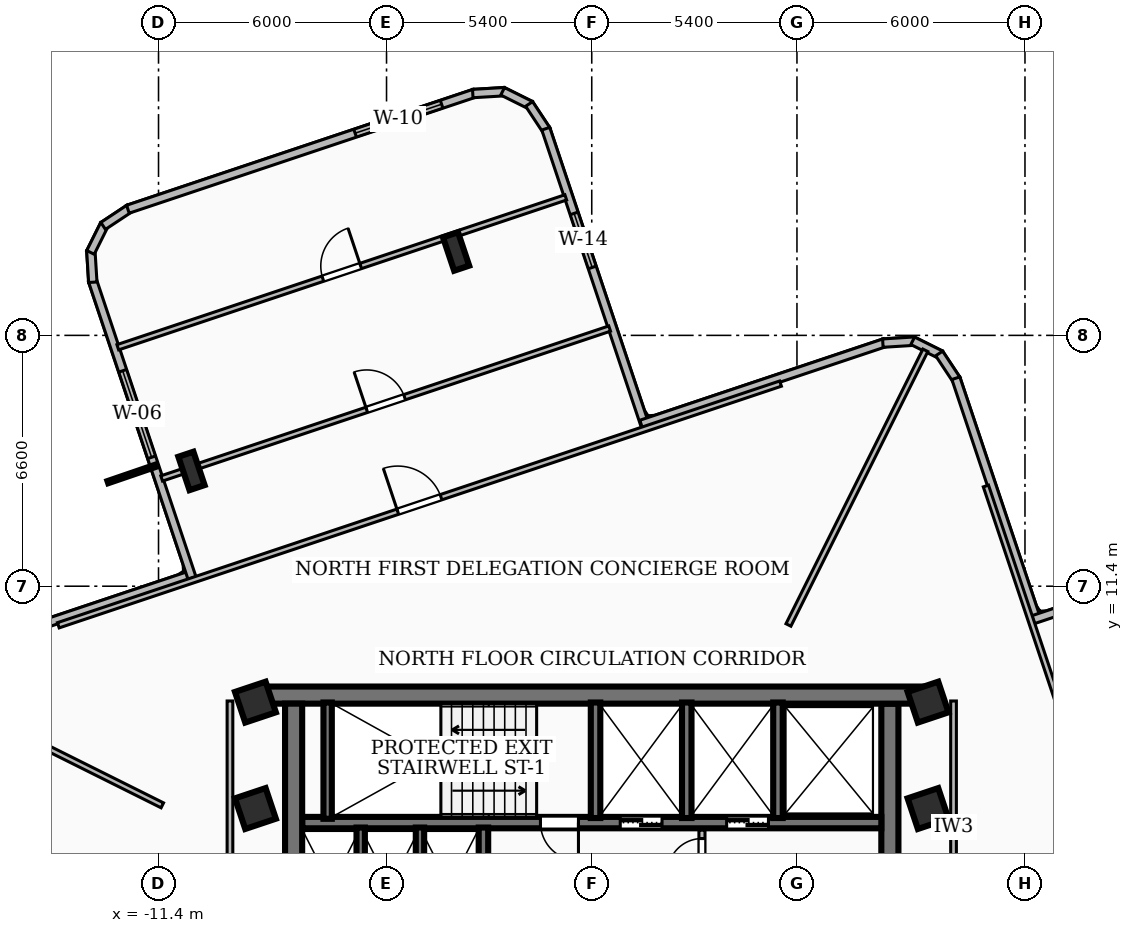
"""IFC4 building model, lengths in metres.
Left out: names, types, materials, properties, quantities, classifications, styles, units other than length and angle.
Written with IfcOpenShell. Run it as: python <this file> out.ifc"""

import sys

from ifc_helpers import new_model, si_unit, direction, frame, frame_2d, origin, origin_2d, place, context, subcontext, project, spatial, rectangle, i_section, extrude, element, fill, save


model = new_model("IFC4")
c1 = context("Model", 3, precision=1e-05, world=origin(), true_north=direction((0.0, 1.0)))
c2 = subcontext(c1, "Body", "Model", "MODEL_VIEW")
j1 = project(units=[si_unit("LENGTHUNIT", "METRE"), si_unit("PLANEANGLEUNIT", "RADIAN")], contexts=[c1])
p1 = place(None, origin())
s1 = spatial("IfcSite", under=j1, at=p1, CompositionType="ELEMENT")
p2 = place(p1, origin())
s2 = spatial("IfcBuilding", under=s1, at=p2, CompositionType="ELEMENT")
p3 = place(p2, frame((0.0, 0.0, 159.48)))
s3 = spatial("IfcBuildingStorey", under=s2, at=p3, CompositionType="ELEMENT", Elevation=159.48)
p4 = place(p3, frame((-8.78, 8.535, 0.0), z_axis=(0.0, 0.0, 1.0), x_axis=(1.0, 0.0, 0.0)))
e1 = element("IfcWall", 1, at=p4, inside=s3, PredefinedType="SHEAR", context=c2, shape_type="SweptSolid", body=[
    extrude(rectangle(XDim=17.56, YDim=0.45, at=frame_2d((8.78, 0.0))), origin(), (0.0, 0.0, 1.0), 3.34),
])
for number, where, z_axis, x_axis in (
    (2, (-7.845, 1.975, 0.0), (0.0, 0.0, 1.0), (0.0, 1.0, 0.0)),
    (3, (7.845, 8.31, 0.0), (0.0, 0.0, 1.0), (0.0, -1.0, 0.0)),
):
    element("IfcWall", number, at=place(p3, frame(where, z_axis=z_axis, x_axis=x_axis)), inside=s3, PredefinedType="SHEAR", context=c2, shape_type="SweptSolid", body=[
        extrude(rectangle(XDim=6.335, YDim=0.45, at=frame_2d((3.167, 0.0))), origin(), (0.0, 0.0, 1.0), 3.34),
    ])
p5 = place(p3, frame((7.62, 5.18, 0.0), z_axis=(0.0, 0.0, 1.0), x_axis=(-1.0, 0.0, 0.0)))
e4 = element("IfcWall", 4, at=p5, inside=s3, PredefinedType="SOLIDWALL", context=c2, shape_type="SweptSolid", body=[
    extrude(rectangle(XDim=15.24, YDim=0.3, at=frame_2d((7.62, 0.0))), origin(), (0.0, 0.0, 1.0), 3.34),
])
p6 = place(p5, frame((5.77, 0.0, 0.0)))
e5 = element("IfcOpeningElement", 5, at=p6, cuts=e4, PredefinedType="OPENING", context=c2, shape_type="SweptSolid", body=[
    extrude(rectangle(XDim=1.1, YDim=2.15, at=frame_2d((0.55, 1.075))), frame((0.0, 0.16, 0.0), z_axis=(0.0, -1.0, 0.0), x_axis=(1.0, 0.0, 0.0)), (0.0, 0.0, 1.0), 0.32),
])
p7 = place(p5, frame((2.97, 0.0, 0.0)))
e6 = element("IfcOpeningElement", 6, at=p7, cuts=e4, PredefinedType="OPENING", context=c2, shape_type="SweptSolid", body=[
    extrude(rectangle(XDim=1.1, YDim=2.15, at=frame_2d((0.55, 1.075))), frame((0.0, 0.16, 0.0), z_axis=(0.0, -1.0, 0.0), x_axis=(1.0, 0.0, 0.0)), (0.0, 0.0, 1.0), 0.32),
])
p8 = place(p5, frame((7.97, 0.0, 0.0)))
e7 = element("IfcOpeningElement", 7, at=p8, cuts=e4, PredefinedType="OPENING", context=c2, shape_type="SweptSolid", body=[
    extrude(rectangle(XDim=1.0, YDim=2.1, at=frame_2d((0.5, 1.05))), frame((0.0, 0.16, 0.0), z_axis=(0.0, -1.0, 0.0), x_axis=(1.0, 0.0, 0.0)), (0.0, 0.0, 1.0), 0.32),
])
p9 = place(p3, frame((-6.95, 5.28, 0.0), z_axis=(0.0, 0.0, 1.0), x_axis=(0.0, 1.0, 0.0)))
e8 = element("IfcWall", 8, at=p9, inside=s3, PredefinedType="SOLIDWALL", context=c2, shape_type="SweptSolid", body=[
    extrude(rectangle(XDim=3.06, YDim=0.22, at=frame_2d((1.53, 0.0))), origin(), (0.0, 0.0, 1.0), 3.34),
])
for number, where, z_axis, x_axis in (
    (9, (0.1, 5.3, 0.0), (0.0, 0.0, 1.0), (0.0, 1.0, 0.0)),
    (10, (2.5, 5.3, 0.0), (0.0, 0.0, 1.0), (0.0, 1.0, 0.0)),
    (11, (4.9, 5.3, 0.0), (0.0, 0.0, 1.0), (0.0, 1.0, 0.0)),
):
    element("IfcWall", number, at=place(p3, frame(where, z_axis=z_axis, x_axis=x_axis)), inside=s3, PredefinedType="SOLIDWALL", context=c2, shape_type="SweptSolid", body=[
        extrude(rectangle(XDim=3.04, YDim=0.25, at=frame_2d((1.52, 0.0))), origin(), (0.0, 0.0, 1.0), 3.34),
    ])
p10 = place(p3, frame((-2.85, 1.98, 0.0), z_axis=(0.0, 0.0, 1.0), x_axis=(0.0, 1.0, 0.0)))
e12 = element("IfcWall", 12, at=p10, inside=s3, PredefinedType="SOLIDWALL", context=c2, shape_type="SweptSolid", body=[
    extrude(rectangle(XDim=3.07, YDim=0.25, at=frame_2d((1.535, 0.0))), origin(), (0.0, 0.0, 1.0), 3.34),
])
for number, where, z_axis, x_axis in (
    (13, (-6.08, 1.98, 0.0), (0.0, 0.0, 1.0), (0.0, 1.0, 0.0)),
    (14, (-4.52, 1.98, 0.0), (0.0, 0.0, 1.0), (0.0, 1.0, 0.0)),
):
    element("IfcWall", number, at=place(p3, frame(where, z_axis=z_axis, x_axis=x_axis)), inside=s3, PredefinedType="SOLIDWALL", context=c2, shape_type="SweptSolid", body=[
        extrude(rectangle(XDim=3.07, YDim=0.22, at=frame_2d((1.535, 0.0))), origin(), (0.0, 0.0, 1.0), 3.34),
    ])
for number, where, z_axis, x_axis in (
    (15, (-8.85, 5.55, 0.0), (0.0, 0.0, 1.0), (0.948, 0.317, 0.0)),
    (16, (8.85, 5.55, 0.0), (0.0, 0.0, 1.0), (0.948, 0.317, 0.0)),
    (17, (-8.85, 8.35, 0.0), (0.0, 0.0, 1.0), (0.948, 0.317, 0.0)),
    (18, (8.85, 8.35, 0.0), (0.0, 0.0, 1.0), (0.948, 0.317, 0.0)),
):
    element("IfcColumn", number, at=place(p3, frame(where, z_axis=z_axis, x_axis=x_axis)), inside=s3, PredefinedType="COLUMN", context=c2, shape_type="SweptSolid", body=[
        extrude(rectangle(XDim=0.85, YDim=0.85, at=origin_2d()), origin(), (0.0, 0.0, 1.0), 3.6),
    ])
for number, where, z_axis, x_axis in (
    (19, (-3.57, 20.207, 0.0), (0.0, 0.0, 1.0), (0.948, 0.317, 0.0)),
    (20, (-10.533, 14.433, 0.0), (0.0, 0.0, 1.0), (0.948, 0.317, 0.0)),
):
    element("IfcColumn", number, at=place(p3, frame(where, z_axis=z_axis, x_axis=x_axis)), inside=s3, PredefinedType="COLUMN", context=c2, shape_type="SweptSolid", body=[
        extrude(i_section(OverallWidth=0.418, OverallDepth=0.927, WebThickness=0.019, FlangeThickness=0.032, at=origin_2d()), origin(), (0.0, 0.0, 1.0), 3.6),
    ])
p11 = place(p3, frame((-16.873, 9.581, 0.0), z_axis=(0.0, 0.0, 1.0), x_axis=(0.94829606055, 0.317387116224, 0.0)))
e21 = element("IfcWall", 21, at=p11, inside=s3, PredefinedType="SOLIDWALL", context=c2, shape_type="SweptSolid", body=[
    extrude(rectangle(XDim=6.758, YDim=0.22, at=frame_2d((3.379, 0.0))), origin(), (0.0, 0.0, 1.0), 3.34),
])
p12 = place(p3, frame((-10.519, 11.615, 0.0), z_axis=(0.0, 0.0, 1.0), x_axis=(-0.317229741122, 0.948348718219, 0.0)))
e22 = element("IfcWall", 22, at=p12, inside=s3, PredefinedType="SOLIDWALL", context=c2, shape_type="SweptSolid", body=[
    extrude(rectangle(XDim=8.259, YDim=0.22, at=frame_2d((4.129, 0.0))), origin(), (0.0, 0.0, 1.0), 3.34),
])
p13 = place(p12, frame((3.35, 0.0, 0.85)))
e23 = element("IfcOpeningElement", 23, at=p13, cuts=e22, PredefinedType="OPENING", context=c2, shape_type="SweptSolid", body=[
    extrude(rectangle(XDim=2.4, YDim=1.85, at=frame_2d((1.2, 0.925))), frame((0.0, 0.12, 0.0), z_axis=(0.0, -1.0, 0.0), x_axis=(1.0, 0.0, 0.0)), (0.0, 0.0, 1.0), 0.24),
])
p14 = place(p3, frame((-13.129, 19.398, 0.0), z_axis=(0.0, 0.0, 1.0), x_axis=(-0.062378286155, 0.998052578483, 0.0)))
e24 = element("IfcWall", 24, at=p14, inside=s3, PredefinedType="SOLIDWALL", context=c2, shape_type="SweptSolid", body=[
    extrude(rectangle(XDim=0.834, YDim=0.22, at=frame_2d((0.417, 0.0))), origin(), (0.0, 0.0, 1.0), 3.34),
])
p15 = place(p3, frame((-13.19, 20.183, 0.0), z_axis=(0.0, 0.0, 1.0), x_axis=(0.445781750405, 0.895141682085, 0.0)))
e25 = element("IfcWall", 25, at=p15, inside=s3, PredefinedType="SOLIDWALL", context=c2, shape_type="SweptSolid", body=[
    extrude(rectangle(XDim=0.819, YDim=0.22, at=frame_2d((0.409, 0.0))), origin(), (0.0, 0.0, 1.0), 3.34),
])
p16 = place(p3, frame((-12.857, 20.88, 0.0), z_axis=(0.0, 0.0, 1.0), x_axis=(0.833621383437, 0.552336300706, 0.0)))
e26 = element("IfcWall", 26, at=p16, inside=s3, PredefinedType="SOLIDWALL", context=c2, shape_type="SweptSolid", body=[
    extrude(rectangle(XDim=0.835, YDim=0.22, at=frame_2d((0.417, 0.0))), origin(), (0.0, 0.0, 1.0), 3.34),
])
p17 = place(p3, frame((-12.206, 21.319, 0.0), z_axis=(0.0, 0.0, 1.0), x_axis=(0.94831980895, 0.317316151421, 0.0)))
e27 = element("IfcWall", 27, at=p17, inside=s3, PredefinedType="SOLIDWALL", context=c2, shape_type="SweptSolid", body=[
    extrude(rectangle(XDim=9.621, YDim=0.22, at=frame_2d((4.811, 0.0))), origin(), (0.0, 0.0, 1.0), 3.34),
])
p18 = place(p17, frame((6.305, 0.0, 0.85)))
e28 = element("IfcOpeningElement", 28, at=p18, cuts=e27, PredefinedType="OPENING", context=c2, shape_type="SweptSolid", body=[
    extrude(rectangle(XDim=2.4, YDim=1.65, at=frame_2d((1.2, 0.825))), frame((0.0, 0.12, 0.0), z_axis=(0.0, -1.0, 0.0), x_axis=(1.0, 0.0, 0.0)), (0.0, 0.0, 1.0), 0.24),
])
p19 = place(p3, frame((-3.131, 24.363, 0.0), z_axis=(0.0, 0.0, 1.0), x_axis=(0.998269325078, 0.05880777677, 0.0)))
e29 = element("IfcWall", 29, at=p19, inside=s3, PredefinedType="SOLIDWALL", context=c2, shape_type="SweptSolid", body=[
    extrude(rectangle(XDim=0.834, YDim=0.22, at=frame_2d((0.417, 0.0))), origin(), (0.0, 0.0, 1.0), 3.34),
])
p20 = place(p3, frame((-2.345, 24.422, 0.0), z_axis=(0.0, 0.0, 1.0), x_axis=(0.895022680219, -0.446020629449, 0.0)))
e30 = element("IfcWall", 30, at=p20, inside=s3, PredefinedType="SOLIDWALL", context=c2, shape_type="SweptSolid", body=[
    extrude(rectangle(XDim=0.819, YDim=0.22, at=frame_2d((0.409, 0.0))), origin(), (0.0, 0.0, 1.0), 3.34),
])
p21 = place(p3, frame((-1.648, 24.089, 0.0), z_axis=(0.0, 0.0, 1.0), x_axis=(0.551319103184, -0.834294460286, 0.0)))
e31 = element("IfcWall", 31, at=p21, inside=s3, PredefinedType="SOLIDWALL", context=c2, shape_type="SweptSolid", body=[
    extrude(rectangle(XDim=0.834, YDim=0.22, at=frame_2d((0.417, 0.0))), origin(), (0.0, 0.0, 1.0), 3.34),
])
p22 = place(p3, frame((-1.21, 23.438, 0.0), z_axis=(0.0, 0.0, 1.0), x_axis=(0.317371670522, -0.948301229963, 0.0)))
e32 = element("IfcWall", 32, at=p22, inside=s3, PredefinedType="SOLIDWALL", context=c2, shape_type="SweptSolid", body=[
    extrude(rectangle(XDim=8.258, YDim=0.22, at=frame_2d((4.129, 0.0))), origin(), (0.0, 0.0, 1.0), 3.34),
])
p23 = place(p22, frame((2.35, 0.0, 0.85)))
e33 = element("IfcOpeningElement", 33, at=p23, cuts=e32, PredefinedType="OPENING", context=c2, shape_type="SweptSolid", body=[
    extrude(rectangle(XDim=1.5, YDim=1.5, at=frame_2d((0.75, 0.75))), frame((0.0, 0.12, 0.0), z_axis=(0.0, -1.0, 0.0), x_axis=(1.0, 0.0, 0.0)), (0.0, 0.0, 1.0), 0.24),
])
p24 = place(p3, frame((1.3, 15.662, 0.0), z_axis=(0.0, 0.0, 1.0), x_axis=(0.948350412494, 0.317224676093, 0.0)))
e34 = element("IfcWall", 34, at=p24, inside=s3, PredefinedType="SOLIDWALL", context=c2, shape_type="SweptSolid", body=[
    extrude(rectangle(XDim=6.758, YDim=0.22, at=frame_2d((3.379, 0.0))), origin(), (0.0, 0.0, 1.0), 3.34),
])
p25 = place(p3, frame((7.66, 17.796, 0.0), z_axis=(0.0, 0.0, 1.0), x_axis=(0.998057128569, 0.062305442082, 0.0)))
e35 = element("IfcWall", 35, at=p25, inside=s3, PredefinedType="SOLIDWALL", context=c2, shape_type="SweptSolid", body=[
    extrude(rectangle(XDim=0.835, YDim=0.22, at=frame_2d((0.417, 0.0))), origin(), (0.0, 0.0, 1.0), 3.34),
])
p26 = place(p3, frame((8.446, 17.857, 0.0), z_axis=(0.0, 0.0, 1.0), x_axis=(0.894904281631, -0.446258139106, 0.0)))
e36 = element("IfcWall", 36, at=p26, inside=s3, PredefinedType="SOLIDWALL", context=c2, shape_type="SweptSolid", body=[
    extrude(rectangle(XDim=0.818, YDim=0.22, at=frame_2d((0.409, 0.0))), origin(), (0.0, 0.0, 1.0), 3.34),
])
p27 = place(p3, frame((9.142, 17.524, 0.0), z_axis=(0.0, 0.0, 1.0), x_axis=(0.552133058206, -0.833756011094, 0.0)))
e37 = element("IfcWall", 37, at=p27, inside=s3, PredefinedType="SOLIDWALL", context=c2, shape_type="SweptSolid", body=[
    extrude(rectangle(XDim=0.835, YDim=0.22, at=frame_2d((0.417, 0.0))), origin(), (0.0, 0.0, 1.0), 3.34),
])
p28 = place(p3, frame((9.581, 16.873, 0.0), z_axis=(0.0, 0.0, 1.0), x_axis=(0.317387116224, -0.94829606055, 0.0)))
e38 = element("IfcWall", 38, at=p28, inside=s3, PredefinedType="SOLIDWALL", context=c2, shape_type="SweptSolid", body=[
    extrude(rectangle(XDim=6.758, YDim=0.22, at=frame_2d((3.379, 0.0))), origin(), (0.0, 0.0, 1.0), 3.34),
])
p29 = place(p3, frame((11.615, 10.519, 0.0), z_axis=(0.0, 0.0, 1.0), x_axis=(0.948331055834, 0.317282537404, 0.0)))
e39 = element("IfcWall", 39, at=p29, inside=s3, PredefinedType="SOLIDWALL", context=c2, shape_type="SweptSolid", body=[
    extrude(rectangle(XDim=9.858, YDim=0.22, at=frame_2d((4.929, 0.0))), origin(), (0.0, 0.0, 1.0), 3.34),
])
p30 = place(p29, frame((6.49, 0.0, 0.85)))
e40 = element("IfcOpeningElement", 40, at=p30, cuts=e39, PredefinedType="OPENING", context=c2, shape_type="SweptSolid", body=[
    extrude(rectangle(XDim=2.4, YDim=1.65, at=frame_2d((1.2, 0.825))), frame((0.0, 0.12, 0.0), z_axis=(0.0, -1.0, 0.0), x_axis=(1.0, 0.0, 0.0)), (0.0, 0.0, 1.0), 0.24),
])
p31 = place(p3, frame((2.9, 2.04, 0.0), z_axis=(0.0, 0.0, 1.0), x_axis=(0.0, 1.0, 0.0)))
e41 = element("IfcWall", 41, at=p31, inside=s3, PredefinedType="PARTITIONING", context=c2, shape_type="SweptSolid", body=[
    extrude(rectangle(XDim=2.94, YDim=0.16, at=frame_2d((1.47, 0.0))), origin(), (0.0, 0.0, 1.0), 2.57),
])
p32 = place(p31, frame((1.82, 0.0, 0.0)))
e42 = element("IfcOpeningElement", 42, at=p32, cuts=e41, PredefinedType="OPENING", context=c2, shape_type="SweptSolid", body=[
    extrude(rectangle(XDim=0.9, YDim=2.06, at=frame_2d((0.45, 1.03))), frame((0.0, 0.09, 0.0), z_axis=(0.0, -1.0, 0.0), x_axis=(1.0, 0.0, 0.0)), (0.0, 0.0, 1.0), 0.18),
])
p33 = place(p3, frame((-9.52, 1.75, 0.0), z_axis=(0.0, 0.0, 1.0), x_axis=(0.0, 1.0, 0.0)))
e43 = element("IfcWall", 43, at=p33, inside=s3, PredefinedType="PARTITIONING", context=c2, shape_type="SweptSolid", body=[
    extrude(rectangle(XDim=6.63, YDim=0.15, at=frame_2d((3.315, 0.0))), origin(), (0.0, 0.0, 1.0), 3.34),
])
p34 = place(p3, frame((9.52, 1.75, 0.0), z_axis=(0.0, 0.0, 1.0), x_axis=(0.0, 1.0, 0.0)))
e44 = element("IfcWall", 44, at=p34, inside=s3, PredefinedType="PARTITIONING", context=c2, shape_type="SweptSolid", body=[
    extrude(rectangle(XDim=6.63, YDim=0.15, at=frame_2d((3.315, 0.0))), origin(), (0.0, 0.0, 1.0), 2.644),
])
p35 = place(p3, frame((5.176, 10.38, 0.0), z_axis=(0.0, 0.0, 1.0), x_axis=(0.446173290391, 0.894946587759, 0.0)))
e45 = element("IfcWall", 45, at=p35, inside=s3, PredefinedType="PARTITIONING", context=c2, shape_type="SweptSolid", body=[
    extrude(rectangle(XDim=8.075, YDim=0.145, at=frame_2d((4.038, 0.0))), origin(), (0.0, 0.0, 1.0), 3.34),
])
p36 = place(p3, frame((-11.3, 5.634, 0.0), z_axis=(0.0, 0.0, 1.0), x_axis=(-0.894904738475, 0.446257222972, 0.0)))
e46 = element("IfcWall", 46, at=p36, inside=s3, PredefinedType="PARTITIONING", context=c2, shape_type="SweptSolid", body=[
    extrude(rectangle(XDim=7.048, YDim=0.145, at=frame_2d((3.524, 0.0))), origin(), (0.0, 0.0, 1.0), 3.34),
])
p37 = place(p3, frame((10.372, 14.037, 0.0), z_axis=(0.0, 0.0, 1.0), x_axis=(0.317298382655, -0.94832575435, 0.0)))
e47 = element("IfcWall", 47, at=p37, inside=s3, PredefinedType="PARTITIONING", context=c2, shape_type="SweptSolid", body=[
    extrude(rectangle(XDim=20.041, YDim=0.145, at=frame_2d((10.021, 0.0))), origin(), (0.0, 0.0, 1.0), 2.644),
])
p38 = place(p37, frame((9.42, 0.0, 0.0)))
e48 = element("IfcOpeningElement", 48, at=p38, cuts=e47, PredefinedType="OPENING", context=c2, shape_type="SweptSolid", body=[
    extrude(rectangle(XDim=1.2, YDim=2.1, at=frame_2d((0.6, 1.05))), frame((0.0, 0.083, 0.0), z_axis=(0.0, -1.0, 0.0), x_axis=(1.0, 0.0, 0.0)), (0.0, 0.0, 1.0), 0.165),
])
p39 = place(p3, frame((-14.037, 10.372, 0.0), z_axis=(0.0, 0.0, 1.0), x_axis=(0.94832575435, 0.317298382655, 0.0)))
e49 = element("IfcWall", 49, at=p39, inside=s3, PredefinedType="PARTITIONING", context=c2, shape_type="SweptSolid", body=[
    extrude(rectangle(XDim=20.041, YDim=0.145, at=frame_2d((10.021, 0.0))), origin(), (0.0, 0.0, 1.0), 2.644),
])
p40 = place(p39, frame((9.42, 0.0, 0.0)))
e50 = element("IfcOpeningElement", 50, at=p40, cuts=e49, PredefinedType="OPENING", context=c2, shape_type="SweptSolid", body=[
    extrude(rectangle(XDim=1.2, YDim=2.1, at=frame_2d((0.6, 1.05))), frame((0.0, 0.083, 0.0), z_axis=(0.0, -1.0, 0.0), x_axis=(1.0, 0.0, 0.0)), (0.0, 0.0, 1.0), 0.165),
])
p41 = place(p3, frame((-11.317, 14.235, 0.0), z_axis=(0.0, 0.0, 1.0), x_axis=(0.948331136084, 0.317282297544, 0.0)))
e51 = element("IfcWall", 51, at=p41, inside=s3, PredefinedType="PARTITIONING", context=c2, shape_type="SweptSolid", body=[
    extrude(rectangle(XDim=12.43, YDim=0.145, at=frame_2d((6.215, 0.0))), origin(), (0.0, 0.0, 1.0), 2.644),
])
p42 = place(p41, frame((5.69, 0.0, 0.0)))
e52 = element("IfcOpeningElement", 52, at=p42, cuts=e51, PredefinedType="OPENING", context=c2, shape_type="SweptSolid", body=[
    extrude(rectangle(XDim=1.05, YDim=2.08, at=frame_2d((0.525, 1.04))), frame((0.0, 0.083, 0.0), z_axis=(0.0, -1.0, 0.0), x_axis=(1.0, 0.0, 0.0)), (0.0, 0.0, 1.0), 0.165),
])
p43 = place(p3, frame((-12.472, 17.687, 0.0), z_axis=(0.0, 0.0, 1.0), x_axis=(0.948325226172, 0.317299961245, 0.0)))
e53 = element("IfcWall", 53, at=p43, inside=s3, PredefinedType="PARTITIONING", context=c2, shape_type="SweptSolid", body=[
    extrude(rectangle(XDim=12.43, YDim=0.145, at=frame_2d((6.215, 0.0))), origin(), (0.0, 0.0, 1.0), 3.34),
])
p44 = place(p43, frame((5.69, 0.0, 0.0)))
e54 = element("IfcOpeningElement", 54, at=p44, cuts=e53, PredefinedType="OPENING", context=c2, shape_type="SweptSolid", body=[
    extrude(rectangle(XDim=1.05, YDim=2.08, at=frame_2d((0.525, 1.04))), frame((0.0, 0.083, 0.0), z_axis=(0.0, -1.0, 0.0), x_axis=(1.0, 0.0, 0.0)), (0.0, 0.0, 1.0), 0.165),
])
p45 = place(p3, frame((-10.372, -14.037, 0.0), z_axis=(0.0, 0.0, 1.0), x_axis=(-0.317298382655, 0.94832575435, 0.0)))
e55 = element("IfcWall", 55, at=p45, inside=s3, PredefinedType="PARTITIONING", context=c2, shape_type="SweptSolid", body=[
    extrude(rectangle(XDim=20.041, YDim=0.145, at=frame_2d((10.021, 0.0))), origin(), (0.0, 0.0, 1.0), 2.644),
])
p46 = place(p45, frame((9.42, 0.0, 0.0)))
e56 = element("IfcOpeningElement", 56, at=p46, cuts=e55, PredefinedType="OPENING", context=c2, shape_type="SweptSolid", body=[
    extrude(rectangle(XDim=1.2, YDim=2.1, at=frame_2d((0.6, 1.05))), frame((0.0, 0.083, 0.0), z_axis=(0.0, -1.0, 0.0), x_axis=(1.0, 0.0, 0.0)), (0.0, 0.0, 1.0), 0.165),
])
p47 = place(p13, origin())
e57 = element("IfcWindow", 57, at=p47, inside=s3, PartitioningType="SINGLE_PANEL", PredefinedType="WINDOW", context=c2, shape_type="SweptSolid", body=[
    extrude(rectangle(XDim=2.4, YDim=1.85, at=frame_2d((1.2, 0.925))), frame((0.0, 0.03, 0.0), z_axis=(0.0, -1.0, 0.0), x_axis=(1.0, 0.0, 0.0)), (0.0, 0.0, 1.0), 0.06),
])
fill(e23, e57)
p48 = place(p18, origin())
e58 = element("IfcWindow", 58, at=p48, inside=s3, PartitioningType="SINGLE_PANEL", PredefinedType="WINDOW", context=c2, shape_type="SweptSolid", body=[
    extrude(rectangle(XDim=2.4, YDim=1.65, at=frame_2d((1.2, 0.825))), frame((0.0, 0.03, 0.0), z_axis=(0.0, -1.0, 0.0), x_axis=(1.0, 0.0, 0.0)), (0.0, 0.0, 1.0), 0.06),
])
fill(e28, e58)
p49 = place(p23, origin())
e59 = element("IfcWindow", 59, at=p49, inside=s3, PartitioningType="SINGLE_PANEL", PredefinedType="WINDOW", context=c2, shape_type="SweptSolid", body=[
    extrude(rectangle(XDim=1.5, YDim=1.5, at=frame_2d((0.75, 0.75))), frame((0.0, 0.03, 0.0), z_axis=(0.0, -1.0, 0.0), x_axis=(1.0, 0.0, 0.0)), (0.0, 0.0, 1.0), 0.06),
])
fill(e33, e59)
p50 = place(p6, origin())
e60 = element("IfcDoor", 60, at=p50, inside=s3, OperationType="DOUBLE_DOOR_SLIDING", PredefinedType="DOOR", context=c2, shape_type="SweptSolid", body=[
    extrude(rectangle(XDim=1.1, YDim=2.15, at=frame_2d((0.55, 1.075))), frame((0.0, 0.025, 0.0), z_axis=(0.0, -1.0, 0.0), x_axis=(1.0, 0.0, 0.0)), (0.0, 0.0, 1.0), 0.05),
])
fill(e5, e60)
p51 = place(p7, origin())
e61 = element("IfcDoor", 61, at=p51, inside=s3, OperationType="DOUBLE_DOOR_SLIDING", PredefinedType="DOOR", context=c2, shape_type="SweptSolid", body=[
    extrude(rectangle(XDim=1.1, YDim=2.15, at=frame_2d((0.55, 1.075))), frame((0.0, 0.025, 0.0), z_axis=(0.0, -1.0, 0.0), x_axis=(1.0, 0.0, 0.0)), (0.0, 0.0, 1.0), 0.05),
])
fill(e6, e61)
p52 = place(p8, origin())
e62 = element("IfcDoor", 62, at=p52, inside=s3, OperationType="SINGLE_SWING_LEFT", PredefinedType="DOOR", context=c2, shape_type="SweptSolid", body=[
    extrude(rectangle(XDim=1.0, YDim=2.1, at=frame_2d((0.5, 1.05))), frame((0.0, 0.025, 0.0), z_axis=(0.0, -1.0, 0.0), x_axis=(1.0, 0.0, 0.0)), (0.0, 0.0, 1.0), 0.05),
])
fill(e7, e62)
p53 = place(p32, origin())
e63 = element("IfcDoor", 63, at=p53, inside=s3, OperationType="SINGLE_SWING_LEFT", PredefinedType="DOOR", context=c2, shape_type="SweptSolid", body=[
    extrude(rectangle(XDim=0.9, YDim=2.06, at=frame_2d((0.45, 1.03))), frame((0.0, 0.025, 0.0), z_axis=(0.0, -1.0, 0.0), x_axis=(1.0, 0.0, 0.0)), (0.0, 0.0, 1.0), 0.05),
])
fill(e42, e63)
p54 = place(p40, origin())
e64 = element("IfcDoor", 64, at=p54, inside=s3, OperationType="SINGLE_SWING_LEFT", PredefinedType="DOOR", context=c2, shape_type="SweptSolid", body=[
    extrude(rectangle(XDim=1.2, YDim=2.1, at=frame_2d((0.6, 1.05))), frame((0.0, 0.025, 0.0), z_axis=(0.0, -1.0, 0.0), x_axis=(1.0, 0.0, 0.0)), (0.0, 0.0, 1.0), 0.05),
])
fill(e50, e64)
p55 = place(p42, origin())
e65 = element("IfcDoor", 65, at=p55, inside=s3, OperationType="SINGLE_SWING_LEFT", PredefinedType="DOOR", context=c2, shape_type="SweptSolid", body=[
    extrude(rectangle(XDim=1.05, YDim=2.08, at=frame_2d((0.525, 1.04))), frame((0.0, 0.025, 0.0), z_axis=(0.0, -1.0, 0.0), x_axis=(1.0, 0.0, 0.0)), (0.0, 0.0, 1.0), 0.05),
])
fill(e52, e65)
p56 = place(p44, origin())
e66 = element("IfcDoor", 66, at=p56, inside=s3, OperationType="SINGLE_SWING_RIGHT", PredefinedType="DOOR", context=c2, shape_type="SweptSolid", body=[
    extrude(rectangle(XDim=1.05, YDim=2.08, at=frame_2d((0.525, 1.04))), frame((0.0, 0.025, 0.0), z_axis=(0.0, -1.0, 0.0), x_axis=(1.0, 0.0, 0.0)), (0.0, 0.0, 1.0), 0.05),
])
fill(e54, e66)
save(model, sys.argv[1])
